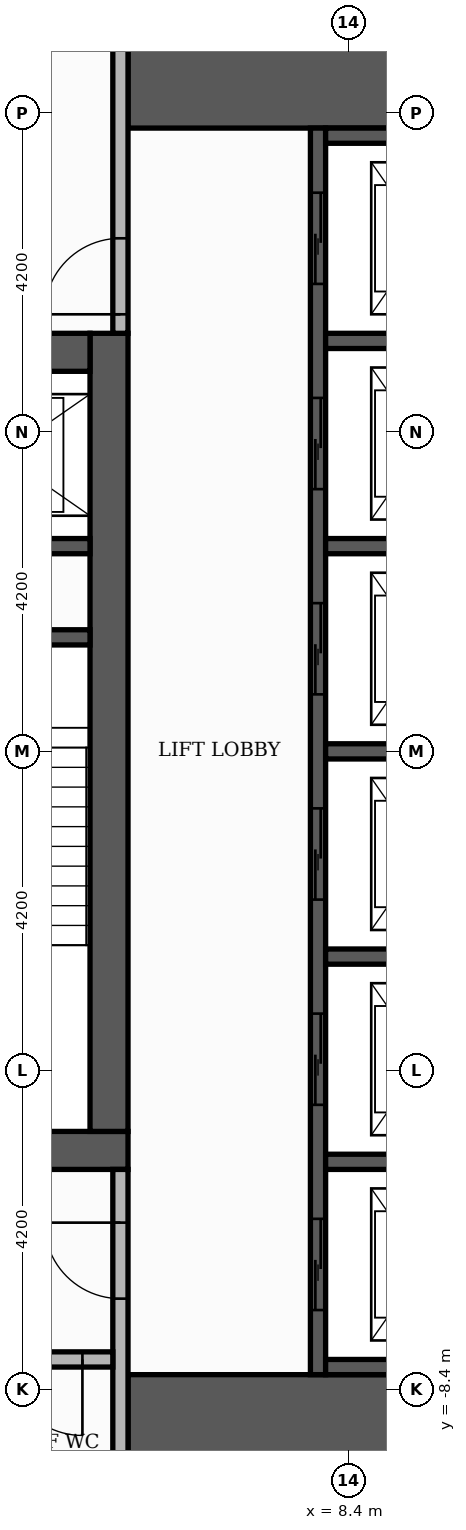
"""IFC4 building model, lengths in metres.
Left out: names, types, materials, properties, quantities, classifications, styles, units other than length and angle.
Written with IfcOpenShell. Run it as: python <this file> out.ifc"""

import sys

from ifc_helpers import new_model, si_unit, direction, frame, frame_2d, origin, place, context, subcontext, project, spatial, rectangle, extrude, element, fill, save


model = new_model("IFC4")
c1 = context("Model", 3, precision=1e-05, world=origin(), true_north=direction((0.0, 1.0)))
c2 = subcontext(c1, "Body", "Model", "MODEL_VIEW")
j1 = project(units=[si_unit("LENGTHUNIT", "METRE"), si_unit("PLANEANGLEUNIT", "RADIAN")], contexts=[c1])
p1 = place(None, origin())
s1 = spatial("IfcSite", under=j1, at=p1, CompositionType="ELEMENT")
p2 = place(p1, origin())
s2 = spatial("IfcBuilding", under=s1, at=p2, CompositionType="ELEMENT")
p3 = place(p2, frame((0.0, 0.0, 271.8)))
s3 = spatial("IfcBuildingStorey", under=s2, at=p3, CompositionType="ELEMENT", Elevation=271.8)
p4 = place(p3, frame((-5.5, -5.25, 0.0), z_axis=(0.0, 0.0, 1.0), x_axis=(1.0, 0.0, 0.0)))
e1 = element("IfcWall", 1, at=p4, inside=s3, PredefinedType="SHEAR", context=c2, shape_type="SweptSolid", body=[
    extrude(rectangle(XDim=11.0, YDim=0.5, at=frame_2d((5.5, 0.0))), origin(), (0.0, 0.0, 1.0), 3.48),
])
p5 = place(p4, frame((4.9, 0.0, 0.0)))
e2 = element("IfcOpeningElement", 2, at=p5, cuts=e1, PredefinedType="OPENING", context=c2, shape_type="SweptSolid", body=[
    extrude(rectangle(XDim=1.2, YDim=2.1, at=frame_2d((0.6, 1.05))), frame((0.0, 0.26, 0.0), z_axis=(0.0, -1.0, 0.0), x_axis=(1.0, 0.0, 0.0)), (0.0, 0.0, 1.0), 0.52),
])
p6 = place(p3, frame((5.25, -5.0, 0.0), z_axis=(0.0, 0.0, 1.0), x_axis=(0.0, 1.0, 0.0)))
e3 = element("IfcWall", 3, at=p6, inside=s3, PredefinedType="SHEAR", context=c2, shape_type="SweptSolid", body=[
    extrude(rectangle(XDim=10.5, YDim=0.5, at=frame_2d((5.25, 0.0))), origin(), (0.0, 0.0, 1.0), 3.48),
])
p7 = place(p3, frame((-5.0, 5.25, 0.0), z_axis=(0.0, 0.0, 1.0), x_axis=(1.0, 0.0, 0.0)))
e4 = element("IfcWall", 4, at=p7, inside=s3, PredefinedType="SHEAR", context=c2, shape_type="SweptSolid", body=[
    extrude(rectangle(XDim=10.0, YDim=0.5, at=frame_2d((5.0, 0.0))), origin(), (0.0, 0.0, 1.0), 3.48),
])
p8 = place(p7, frame((4.4, 0.0, 0.0)))
e5 = element("IfcOpeningElement", 5, at=p8, cuts=e4, PredefinedType="OPENING", context=c2, shape_type="SweptSolid", body=[
    extrude(rectangle(XDim=1.2, YDim=2.1, at=frame_2d((0.6, 1.05))), frame((0.0, 0.26, 0.0), z_axis=(0.0, -1.0, 0.0), x_axis=(1.0, 0.0, 0.0)), (0.0, 0.0, 1.0), 0.52),
])
for number, where, z_axis, x_axis in (
    (6, (5.5, -9.15, 0.0), (0.0, 0.0, 1.0), (1.0, 0.0, 0.0)),
    (7, (5.5, 9.15, 0.0), (0.0, 0.0, 1.0), (1.0, 0.0, 0.0)),
):
    element("IfcWall", number, at=place(p3, frame(where, z_axis=z_axis, x_axis=x_axis)), inside=s3, PredefinedType="SHEAR", context=c2, shape_type="SweptSolid", body=[
        extrude(rectangle(XDim=4.6, YDim=1.9, at=frame_2d((2.3, 0.0))), origin(), (0.0, 0.0, 1.0), 3.48),
    ])
p9 = place(p3, frame((2.15, 1.5, 0.0), z_axis=(0.0, 0.0, 1.0), x_axis=(1.0, 0.0, 0.0)))
e8 = element("IfcWall", 8, at=p9, inside=s3, PredefinedType="SHEAR", context=c2, shape_type="SweptSolid", body=[
    extrude(rectangle(XDim=2.85, YDim=0.2, at=frame_2d((1.425, 0.0))), origin(), (0.0, 0.0, 1.0), 3.48),
])
p10 = place(p3, frame((8.0, -8.2, 0.0), z_axis=(0.0, 0.0, 1.0), x_axis=(0.0, 1.0, 0.0)))
e9 = element("IfcWall", 9, at=p10, inside=s3, PredefinedType="SHEAR", context=c2, shape_type="SweptSolid", body=[
    extrude(rectangle(XDim=16.4, YDim=0.2, at=frame_2d((8.2, 0.0))), origin(), (0.0, 0.0, 1.0), 3.48),
])
p11 = place(p10, frame((0.85, 0.0, 0.0)))
e10 = element("IfcOpeningElement", 10, at=p11, cuts=e9, PredefinedType="OPENING", context=c2, shape_type="SweptSolid", body=[
    extrude(rectangle(XDim=1.2, YDim=2.1, at=frame_2d((0.6, 1.05))), frame((0.0, 0.11, 0.0), z_axis=(0.0, -1.0, 0.0), x_axis=(1.0, 0.0, 0.0)), (0.0, 0.0, 1.0), 0.22),
])
p12 = place(p10, frame((3.55, 0.0, 0.0)))
e11 = element("IfcOpeningElement", 11, at=p12, cuts=e9, PredefinedType="OPENING", context=c2, shape_type="SweptSolid", body=[
    extrude(rectangle(XDim=1.2, YDim=2.1, at=frame_2d((0.6, 1.05))), frame((0.0, 0.11, 0.0), z_axis=(0.0, -1.0, 0.0), x_axis=(1.0, 0.0, 0.0)), (0.0, 0.0, 1.0), 0.22),
])
p13 = place(p10, frame((6.25, 0.0, 0.0)))
e12 = element("IfcOpeningElement", 12, at=p13, cuts=e9, PredefinedType="OPENING", context=c2, shape_type="SweptSolid", body=[
    extrude(rectangle(XDim=1.2, YDim=2.1, at=frame_2d((0.6, 1.05))), frame((0.0, 0.11, 0.0), z_axis=(0.0, -1.0, 0.0), x_axis=(1.0, 0.0, 0.0)), (0.0, 0.0, 1.0), 0.22),
])
p14 = place(p10, frame((8.95, 0.0, 0.0)))
e13 = element("IfcOpeningElement", 13, at=p14, cuts=e9, PredefinedType="OPENING", context=c2, shape_type="SweptSolid", body=[
    extrude(rectangle(XDim=1.2, YDim=2.1, at=frame_2d((0.6, 1.05))), frame((0.0, 0.11, 0.0), z_axis=(0.0, -1.0, 0.0), x_axis=(1.0, 0.0, 0.0)), (0.0, 0.0, 1.0), 0.22),
])
p15 = place(p10, frame((11.65, 0.0, 0.0)))
e14 = element("IfcOpeningElement", 14, at=p15, cuts=e9, PredefinedType="OPENING", context=c2, shape_type="SweptSolid", body=[
    extrude(rectangle(XDim=1.2, YDim=2.1, at=frame_2d((0.6, 1.05))), frame((0.0, 0.11, 0.0), z_axis=(0.0, -1.0, 0.0), x_axis=(1.0, 0.0, 0.0)), (0.0, 0.0, 1.0), 0.22),
])
p16 = place(p10, frame((14.35, 0.0, 0.0)))
e15 = element("IfcOpeningElement", 15, at=p16, cuts=e9, PredefinedType="OPENING", context=c2, shape_type="SweptSolid", body=[
    extrude(rectangle(XDim=1.2, YDim=2.1, at=frame_2d((0.6, 1.05))), frame((0.0, 0.11, 0.0), z_axis=(0.0, -1.0, 0.0), x_axis=(1.0, 0.0, 0.0)), (0.0, 0.0, 1.0), 0.22),
])
for number, where, z_axis, x_axis in (
    (16, (8.1, -8.1, 0.0), (0.0, 0.0, 1.0), (1.0, 0.0, 0.0)),
    (17, (8.1, -5.4, 0.0), (0.0, 0.0, 1.0), (1.0, 0.0, 0.0)),
    (18, (8.1, -2.7, 0.0), (0.0, 0.0, 1.0), (1.0, 0.0, 0.0)),
    (19, (8.1, 0.0, 0.0), (0.0, 0.0, 1.0), (1.0, 0.0, 0.0)),
):
    element("IfcWall", number, at=place(p3, frame(where, z_axis=z_axis, x_axis=x_axis)), inside=s3, PredefinedType="SHEAR", context=c2, shape_type="SweptSolid", body=[
        extrude(rectangle(XDim=2.0, YDim=0.2, at=frame_2d((1.0, 0.0))), origin(), (0.0, 0.0, 1.0), 3.48),
    ])
p17 = place(p3, frame((2.15, 2.7, 0.0), z_axis=(0.0, 0.0, 1.0), x_axis=(1.0, 0.0, 0.0)))
e20 = element("IfcWall", 20, at=p17, inside=s3, PredefinedType="SHEAR", context=c2, shape_type="SweptSolid", body=[
    extrude(rectangle(XDim=2.85, YDim=0.2, at=frame_2d((1.425, 0.0))), origin(), (0.0, 0.0, 1.0), 3.48),
])
for number, where, z_axis, x_axis in (
    (21, (8.1, 2.7, 0.0), (0.0, 0.0, 1.0), (1.0, 0.0, 0.0)),
    (22, (8.1, 5.4, 0.0), (0.0, 0.0, 1.0), (1.0, 0.0, 0.0)),
    (23, (8.1, 8.1, 0.0), (0.0, 0.0, 1.0), (1.0, 0.0, 0.0)),
):
    element("IfcWall", number, at=place(p3, frame(where, z_axis=z_axis, x_axis=x_axis)), inside=s3, PredefinedType="SHEAR", context=c2, shape_type="SweptSolid", body=[
        extrude(rectangle(XDim=2.0, YDim=0.2, at=frame_2d((1.0, 0.0))), origin(), (0.0, 0.0, 1.0), 3.48),
    ])
p18 = place(p3, frame((5.4, -10.1, 0.0), z_axis=(0.0, 0.0, 1.0), x_axis=(0.0, 1.0, 0.0)))
e24 = element("IfcWall", 24, at=p18, inside=s3, PredefinedType="PARTITIONING", context=c2, shape_type="SweptSolid", body=[
    extrude(rectangle(XDim=4.6, YDim=0.2, at=frame_2d((2.3, 0.0))), origin(), (0.0, 0.0, 1.0), 3.48),
])
p19 = place(p18, frame((2.9, 0.0, 0.0)))
e25 = element("IfcOpeningElement", 25, at=p19, cuts=e24, PredefinedType="OPENING", context=c2, shape_type="SweptSolid", body=[
    extrude(rectangle(XDim=1.0, YDim=2.1, at=frame_2d((0.5, 1.05))), frame((0.0, 0.11, 0.0), z_axis=(0.0, -1.0, 0.0), x_axis=(1.0, 0.0, 0.0)), (0.0, 0.0, 1.0), 0.22),
])
p20 = place(p3, frame((3.55, -8.0, 0.0), z_axis=(0.0, 0.0, 1.0), x_axis=(1.0, 0.0, 0.0)))
e26 = element("IfcWall", 26, at=p20, inside=s3, PredefinedType="PARTITIONING", context=c2, shape_type="SweptSolid", body=[
    extrude(rectangle(XDim=1.75, YDim=0.2, at=frame_2d((0.875, 0.0))), origin(), (0.0, 0.0, 1.0), 3.48),
])
p21 = place(p20, frame((0.35, 0.0, 0.0)))
e27 = element("IfcOpeningElement", 27, at=p21, cuts=e26, PredefinedType="OPENING", context=c2, shape_type="SweptSolid", body=[
    extrude(rectangle(XDim=1.0, YDim=2.1, at=frame_2d((0.5, 1.05))), frame((0.0, 0.11, 0.0), z_axis=(0.0, -1.0, 0.0), x_axis=(1.0, 0.0, 0.0)), (0.0, 0.0, 1.0), 0.22),
])
p22 = place(p3, frame((5.4, 5.5, 0.0), z_axis=(0.0, 0.0, 1.0), x_axis=(0.0, 1.0, 0.0)))
e28 = element("IfcWall", 28, at=p22, inside=s3, PredefinedType="PARTITIONING", context=c2, shape_type="SweptSolid", body=[
    extrude(rectangle(XDim=4.6, YDim=0.2, at=frame_2d((2.3, 0.0))), origin(), (0.0, 0.0, 1.0), 3.48),
])
p23 = place(p22, frame((0.25, 0.0, 0.0)))
e29 = element("IfcOpeningElement", 29, at=p23, cuts=e28, PredefinedType="OPENING", context=c2, shape_type="SweptSolid", body=[
    extrude(rectangle(XDim=1.0, YDim=2.1, at=frame_2d((0.5, 1.05))), frame((0.0, 0.11, 0.0), z_axis=(0.0, -1.0, 0.0), x_axis=(1.0, 0.0, 0.0)), (0.0, 0.0, 1.0), 0.22),
])
p24 = place(p11, origin())
e30 = element("IfcDoor", 30, at=p24, inside=s3, OperationType="SLIDING_TO_LEFT", PredefinedType="DOOR", context=c2, shape_type="SweptSolid", body=[
    extrude(rectangle(XDim=1.2, YDim=2.1, at=frame_2d((0.6, 1.05))), frame((0.0, 0.025, 0.0), z_axis=(0.0, -1.0, 0.0), x_axis=(1.0, 0.0, 0.0)), (0.0, 0.0, 1.0), 0.05),
])
fill(e10, e30)
p25 = place(p12, origin())
e31 = element("IfcDoor", 31, at=p25, inside=s3, OperationType="SLIDING_TO_LEFT", PredefinedType="DOOR", context=c2, shape_type="SweptSolid", body=[
    extrude(rectangle(XDim=1.2, YDim=2.1, at=frame_2d((0.6, 1.05))), frame((0.0, 0.025, 0.0), z_axis=(0.0, -1.0, 0.0), x_axis=(1.0, 0.0, 0.0)), (0.0, 0.0, 1.0), 0.05),
])
fill(e11, e31)
p26 = place(p13, origin())
e32 = element("IfcDoor", 32, at=p26, inside=s3, OperationType="SLIDING_TO_LEFT", PredefinedType="DOOR", context=c2, shape_type="SweptSolid", body=[
    extrude(rectangle(XDim=1.2, YDim=2.1, at=frame_2d((0.6, 1.05))), frame((0.0, 0.025, 0.0), z_axis=(0.0, -1.0, 0.0), x_axis=(1.0, 0.0, 0.0)), (0.0, 0.0, 1.0), 0.05),
])
fill(e12, e32)
p27 = place(p14, origin())
e33 = element("IfcDoor", 33, at=p27, inside=s3, OperationType="SLIDING_TO_LEFT", PredefinedType="DOOR", context=c2, shape_type="SweptSolid", body=[
    extrude(rectangle(XDim=1.2, YDim=2.1, at=frame_2d((0.6, 1.05))), frame((0.0, 0.025, 0.0), z_axis=(0.0, -1.0, 0.0), x_axis=(1.0, 0.0, 0.0)), (0.0, 0.0, 1.0), 0.05),
])
fill(e13, e33)
p28 = place(p15, origin())
e34 = element("IfcDoor", 34, at=p28, inside=s3, OperationType="SLIDING_TO_LEFT", PredefinedType="DOOR", context=c2, shape_type="SweptSolid", body=[
    extrude(rectangle(XDim=1.2, YDim=2.1, at=frame_2d((0.6, 1.05))), frame((0.0, 0.025, 0.0), z_axis=(0.0, -1.0, 0.0), x_axis=(1.0, 0.0, 0.0)), (0.0, 0.0, 1.0), 0.05),
])
fill(e14, e34)
p29 = place(p16, origin())
e35 = element("IfcDoor", 35, at=p29, inside=s3, OperationType="SLIDING_TO_LEFT", PredefinedType="DOOR", context=c2, shape_type="SweptSolid", body=[
    extrude(rectangle(XDim=1.2, YDim=2.1, at=frame_2d((0.6, 1.05))), frame((0.0, 0.025, 0.0), z_axis=(0.0, -1.0, 0.0), x_axis=(1.0, 0.0, 0.0)), (0.0, 0.0, 1.0), 0.05),
])
fill(e15, e35)
p30 = place(p23, origin())
e36 = element("IfcDoor", 36, at=p30, inside=s3, OperationType="SINGLE_SWING_LEFT", PredefinedType="DOOR", context=c2, shape_type="SweptSolid", body=[
    extrude(rectangle(XDim=1.0, YDim=2.1, at=frame_2d((0.5, 1.05))), frame((0.0, 0.025, 0.0), z_axis=(0.0, -1.0, 0.0), x_axis=(1.0, 0.0, 0.0)), (0.0, 0.0, 1.0), 0.05),
])
fill(e29, e36)
p31 = place(p19, origin())
e37 = element("IfcDoor", 37, at=p31, inside=s3, OperationType="SINGLE_SWING_RIGHT", PredefinedType="DOOR", context=c2, shape_type="SweptSolid", body=[
    extrude(rectangle(XDim=1.0, YDim=2.1, at=frame_2d((0.5, 1.05))), frame((0.0, 0.025, 0.0), z_axis=(0.0, -1.0, 0.0), x_axis=(1.0, 0.0, 0.0)), (0.0, 0.0, 1.0), 0.05),
])
fill(e25, e37)
p32 = place(p21, frame((1.0, 0.0, 0.0), z_axis=(0.0, 0.0, 1.0), x_axis=(-1.0, 0.0, 0.0)))
e38 = element("IfcDoor", 38, at=p32, inside=s3, OperationType="SINGLE_SWING_RIGHT", PredefinedType="DOOR", context=c2, shape_type="SweptSolid", body=[
    extrude(rectangle(XDim=1.0, YDim=2.1, at=frame_2d((0.5, 1.05))), frame((0.0, 0.025, 0.0), z_axis=(0.0, -1.0, 0.0), x_axis=(1.0, 0.0, 0.0)), (0.0, 0.0, 1.0), 0.05),
])
fill(e27, e38)
save(model, sys.argv[1])
